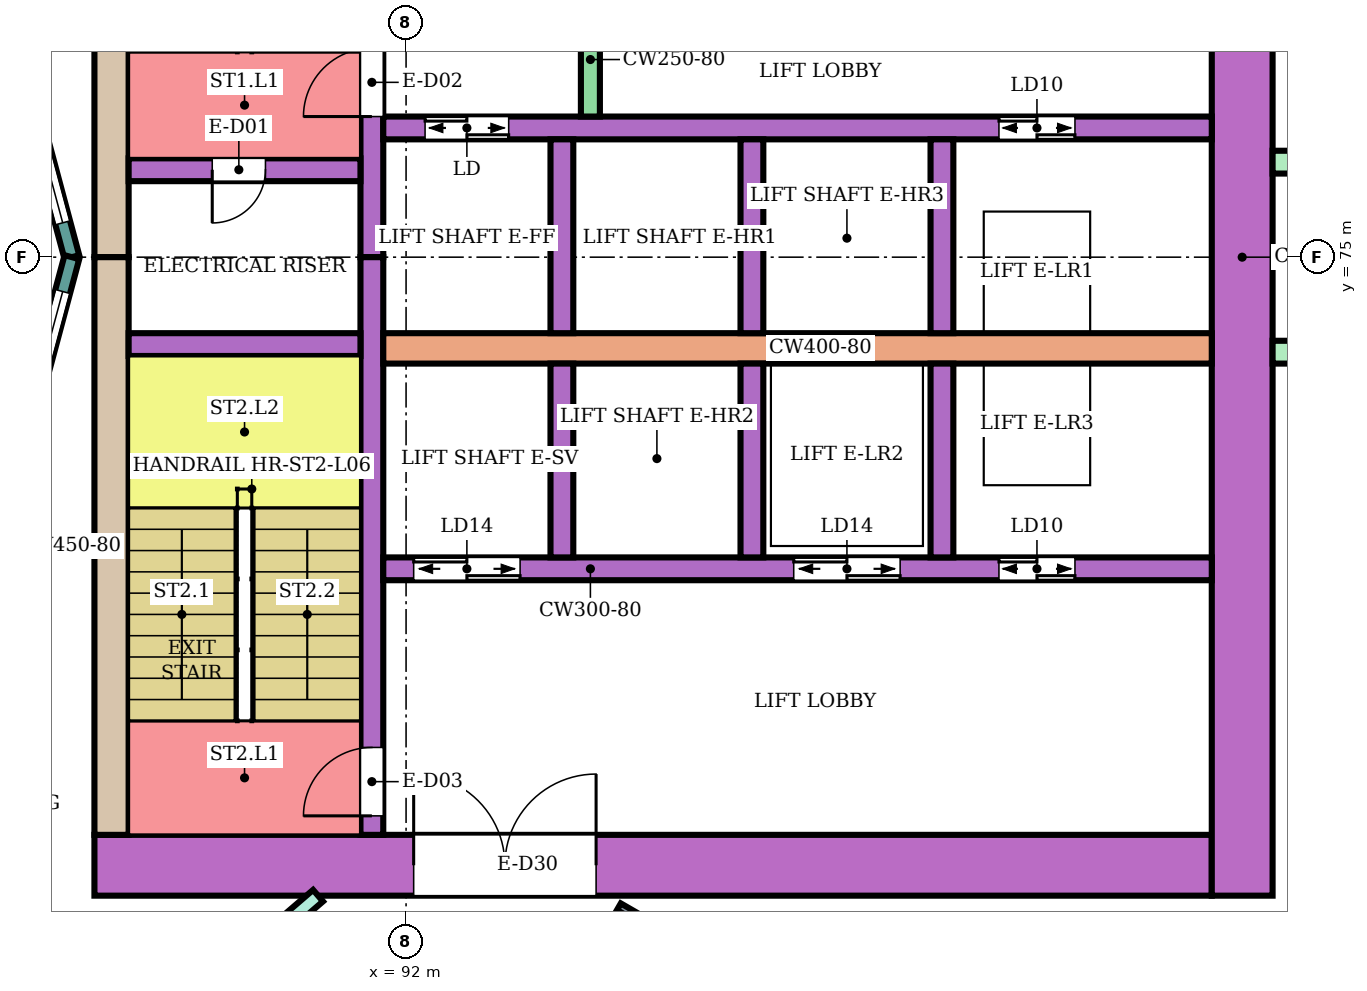
"""IFC4 building model, lengths in metres.
Left out: names, types, materials, properties, quantities, classifications, styles, units other than length and angle.
Written with IfcOpenShell. Run it as: python <this file> out.ifc"""

import sys

from ifc_helpers import new_model, si_unit, direction, frame, frame_2d, origin, place, context, subcontext, project, spatial, rectangle, extrude, element, fill, save


model = new_model("IFC4")
c1 = context("Model", 3, precision=1e-05, world=origin(), true_north=direction((0.0, 1.0)))
c2 = subcontext(c1, "Body", "Model", "MODEL_VIEW")
j1 = project(units=[si_unit("LENGTHUNIT", "METRE"), si_unit("PLANEANGLEUNIT", "RADIAN")], contexts=[c1])
p1 = place(None, origin())
s1 = spatial("IfcSite", under=j1, at=p1, CompositionType="ELEMENT")
p2 = place(p1, origin())
s2 = spatial("IfcBuilding", under=s1, at=p2, CompositionType="ELEMENT")
p3 = place(p2, frame((0.0, 0.0, 32.6)))
s3 = spatial("IfcBuildingStorey", under=s2, at=p3, CompositionType="ELEMENT", Elevation=32.6)
p4 = place(p3, frame((87.9, 67.0, 0.0), z_axis=(0.0, 0.0, 1.0), x_axis=(1.0, 0.0, 0.0)))
e1 = element("IfcWall", 1, at=p4, inside=s3, PredefinedType="SHEAR", context=c2, shape_type="SweptSolid", body=[
    extrude(rectangle(XDim=14.7, YDim=0.8, at=frame_2d((7.35, 0.0))), origin(), (0.0, 0.0, 1.0), 3.48),
])
p5 = place(p4, frame((4.2, 0.0, 0.0)))
e2 = element("IfcOpeningElement", 2, at=p5, cuts=e1, PredefinedType="OPENING", context=c2, shape_type="SweptSolid", body=[
    extrude(rectangle(XDim=2.4, YDim=2.4, at=frame_2d((1.2, 1.2))), frame((0.0, 0.41, 0.0), z_axis=(0.0, -1.0, 0.0), x_axis=(1.0, 0.0, 0.0)), (0.0, 0.0, 1.0), 0.82),
])
for number, where, z_axis, x_axis in (
    (3, (88.125, 75.0, 0.0), (0.0, 0.0, 1.0), (0.0, 1.0, 0.0)),
    (4, (88.125, 67.4, 0.0), (0.0, 0.0, 1.0), (0.0, 1.0, 0.0)),
):
    element("IfcWall", number, at=place(p3, frame(where, z_axis=z_axis, x_axis=x_axis)), inside=s3, PredefinedType="SHEAR", context=c2, shape_type="SweptSolid", body=[
        extrude(rectangle(XDim=7.6, YDim=0.45, at=frame_2d((3.8, 0.0))), origin(), (0.0, 0.0, 1.0), 3.48),
    ])
p6 = place(p3, frame((103.0, 66.6, 0.0), z_axis=(0.0, 0.0, 1.0), x_axis=(0.0, 1.0, 0.0)))
e5 = element("IfcWall", 5, at=p6, inside=s3, PredefinedType="SHEAR", context=c2, shape_type="SweptSolid", body=[
    extrude(rectangle(XDim=16.8, YDim=0.8, at=frame_2d((8.4, 0.0))), origin(), (0.0, 0.0, 1.0), 3.48),
])
p7 = place(p3, frame((91.55, 75.0, 0.0), z_axis=(0.0, 0.0, 1.0), x_axis=(0.0, 1.0, 0.0)))
e6 = element("IfcWall", 6, at=p7, inside=s3, PredefinedType="SHEAR", context=c2, shape_type="SweptSolid", body=[
    extrude(rectangle(XDim=7.6, YDim=0.3, at=frame_2d((3.8, 0.0))), origin(), (0.0, 0.0, 1.0), 3.48),
])
p8 = place(p7, frame((1.85, 0.0, 0.0)))
e7 = element("IfcOpeningElement", 7, at=p8, cuts=e6, PredefinedType="OPENING", context=c2, shape_type="SweptSolid", body=[
    extrude(rectangle(XDim=0.9, YDim=2.1, at=frame_2d((0.45, 1.05))), frame((0.0, 0.16, 0.0), z_axis=(0.0, -1.0, 0.0), x_axis=(1.0, 0.0, 0.0)), (0.0, 0.0, 1.0), 0.32),
])
p9 = place(p3, frame((91.55, 67.4, 0.0), z_axis=(0.0, 0.0, 1.0), x_axis=(0.0, 1.0, 0.0)))
e8 = element("IfcWall", 8, at=p9, inside=s3, PredefinedType="SHEAR", context=c2, shape_type="SweptSolid", body=[
    extrude(rectangle(XDim=7.6, YDim=0.3, at=frame_2d((3.8, 0.0))), origin(), (0.0, 0.0, 1.0), 3.48),
])
p10 = place(p9, frame((0.25, 0.0, 0.0)))
e9 = element("IfcOpeningElement", 9, at=p10, cuts=e8, PredefinedType="OPENING", context=c2, shape_type="SweptSolid", body=[
    extrude(rectangle(XDim=0.9, YDim=2.1, at=frame_2d((0.45, 1.05))), frame((0.0, 0.16, 0.0), z_axis=(0.0, -1.0, 0.0), x_axis=(1.0, 0.0, 0.0)), (0.0, 0.0, 1.0), 0.32),
])
p11 = place(p3, frame((88.35, 76.15, 0.0), z_axis=(0.0, 0.0, 1.0), x_axis=(1.0, 0.0, 0.0)))
e10 = element("IfcWall", 10, at=p11, inside=s3, PredefinedType="SHEAR", context=c2, shape_type="SweptSolid", body=[
    extrude(rectangle(XDim=3.05, YDim=0.3, at=frame_2d((1.525, 0.0))), origin(), (0.0, 0.0, 1.0), 3.48),
])
p12 = place(p11, frame((1.1, 0.0, 0.0)))
e11 = element("IfcOpeningElement", 11, at=p12, cuts=e10, PredefinedType="OPENING", context=c2, shape_type="SweptSolid", body=[
    extrude(rectangle(XDim=0.7, YDim=2.0, at=frame_2d((0.35, 1.0))), frame((0.0, 0.16, 0.0), z_axis=(0.0, -1.0, 0.0), x_axis=(1.0, 0.0, 0.0)), (0.0, 0.0, 1.0), 0.32),
])
p13 = place(p3, frame((88.35, 73.85, 0.0), z_axis=(0.0, 0.0, 1.0), x_axis=(1.0, 0.0, 0.0)))
e12 = element("IfcWall", 12, at=p13, inside=s3, PredefinedType="SHEAR", context=c2, shape_type="SweptSolid", body=[
    extrude(rectangle(XDim=3.05, YDim=0.3, at=frame_2d((1.525, 0.0))), origin(), (0.0, 0.0, 1.0), 3.48),
])
p14 = place(p3, frame((91.7, 76.7, 0.0), z_axis=(0.0, 0.0, 1.0), x_axis=(1.0, 0.0, 0.0)))
e13 = element("IfcWall", 13, at=p14, inside=s3, PredefinedType="SHEAR", context=c2, shape_type="SweptSolid", body=[
    extrude(rectangle(XDim=10.9, YDim=0.3, at=frame_2d((5.45, 0.0))), origin(), (0.0, 0.0, 1.0), 3.48),
])
p15 = place(p14, frame((0.55, 0.0, 0.0)))
e14 = element("IfcOpeningElement", 14, at=p15, cuts=e13, PredefinedType="OPENING", context=c2, shape_type="SweptSolid", body=[
    extrude(rectangle(XDim=1.1, YDim=2.1, at=frame_2d((0.55, 1.05))), frame((0.0, 0.16, 0.0), z_axis=(0.0, -1.0, 0.0), x_axis=(1.0, 0.0, 0.0)), (0.0, 0.0, 1.0), 0.32),
])
p16 = place(p14, frame((8.1, 0.0, 0.0)))
e15 = element("IfcOpeningElement", 15, at=p16, cuts=e13, PredefinedType="OPENING", context=c2, shape_type="SweptSolid", body=[
    extrude(rectangle(XDim=1.0, YDim=2.1, at=frame_2d((0.5, 1.05))), frame((0.0, 0.16, 0.0), z_axis=(0.0, -1.0, 0.0), x_axis=(1.0, 0.0, 0.0)), (0.0, 0.0, 1.0), 0.32),
])
p17 = place(p3, frame((91.7, 73.8, 0.0), z_axis=(0.0, 0.0, 1.0), x_axis=(1.0, 0.0, 0.0)))
e16 = element("IfcWall", 16, at=p17, inside=s3, PredefinedType="SHEAR", context=c2, shape_type="SweptSolid", body=[
    extrude(rectangle(XDim=10.9, YDim=0.4, at=frame_2d((5.45, 0.0))), origin(), (0.0, 0.0, 1.0), 3.48),
])
p18 = place(p3, frame((91.7, 70.9, 0.0), z_axis=(0.0, 0.0, 1.0), x_axis=(1.0, 0.0, 0.0)))
e17 = element("IfcWall", 17, at=p18, inside=s3, PredefinedType="SHEAR", context=c2, shape_type="SweptSolid", body=[
    extrude(rectangle(XDim=10.9, YDim=0.3, at=frame_2d((5.45, 0.0))), origin(), (0.0, 0.0, 1.0), 3.48),
])
p19 = place(p18, frame((0.4, 0.0, 0.0)))
e18 = element("IfcOpeningElement", 18, at=p19, cuts=e17, PredefinedType="OPENING", context=c2, shape_type="SweptSolid", body=[
    extrude(rectangle(XDim=1.4, YDim=2.1, at=frame_2d((0.7, 1.05))), frame((0.0, 0.16, 0.0), z_axis=(0.0, -1.0, 0.0), x_axis=(1.0, 0.0, 0.0)), (0.0, 0.0, 1.0), 0.32),
])
p20 = place(p18, frame((5.4, 0.0, 0.0)))
e19 = element("IfcOpeningElement", 19, at=p20, cuts=e17, PredefinedType="OPENING", context=c2, shape_type="SweptSolid", body=[
    extrude(rectangle(XDim=1.4, YDim=2.1, at=frame_2d((0.7, 1.05))), frame((0.0, 0.16, 0.0), z_axis=(0.0, -1.0, 0.0), x_axis=(1.0, 0.0, 0.0)), (0.0, 0.0, 1.0), 0.32),
])
p21 = place(p18, frame((8.1, 0.0, 0.0)))
e20 = element("IfcOpeningElement", 20, at=p21, cuts=e17, PredefinedType="OPENING", context=c2, shape_type="SweptSolid", body=[
    extrude(rectangle(XDim=1.0, YDim=2.1, at=frame_2d((0.5, 1.05))), frame((0.0, 0.16, 0.0), z_axis=(0.0, -1.0, 0.0), x_axis=(1.0, 0.0, 0.0)), (0.0, 0.0, 1.0), 0.32),
])
for number, where, z_axis, x_axis in (
    (21, (94.05, 74.0, 0.0), (0.0, 0.0, 1.0), (0.0, 1.0, 0.0)),
    (22, (96.55, 74.0, 0.0), (0.0, 0.0, 1.0), (0.0, 1.0, 0.0)),
    (23, (99.05, 74.0, 0.0), (0.0, 0.0, 1.0), (0.0, 1.0, 0.0)),
    (24, (94.05, 71.05, 0.0), (0.0, 0.0, 1.0), (0.0, 1.0, 0.0)),
    (25, (96.55, 71.05, 0.0), (0.0, 0.0, 1.0), (0.0, 1.0, 0.0)),
    (26, (99.05, 71.05, 0.0), (0.0, 0.0, 1.0), (0.0, 1.0, 0.0)),
):
    element("IfcWall", number, at=place(p3, frame(where, z_axis=z_axis, x_axis=x_axis)), inside=s3, PredefinedType="SHEAR", context=c2, shape_type="SweptSolid", body=[
        extrude(rectangle(XDim=2.55, YDim=0.3, at=frame_2d((1.275, 0.0))), origin(), (0.0, 0.0, 1.0), 3.48),
    ])
p22 = place(p3, frame((94.425, 76.85, 0.0), z_axis=(0.0, 0.0, 1.0), x_axis=(0.0, 1.0, 0.0)))
e27 = element("IfcWall", 27, at=p22, inside=s3, PredefinedType="SHEAR", context=c2, shape_type="SweptSolid", body=[
    extrude(rectangle(XDim=1.5, YDim=0.25, at=frame_2d((0.75, 0.0))), origin(), (0.0, 0.0, 1.0), 3.48),
])
for number, where, z_axis, x_axis in (
    (28, (103.4, 73.75, 0.0), (0.0, 0.0, 1.0), (1.0, 0.0, 0.0)),
    (29, (103.4, 76.25, 0.0), (0.0, 0.0, 1.0), (1.0, 0.0, 0.0)),
):
    element("IfcWall", number, at=place(p3, frame(where, z_axis=z_axis, x_axis=x_axis)), inside=s3, PredefinedType="NOTDEFINED", context=c2, shape_type="SweptSolid", body=[
        extrude(rectangle(XDim=2.416, YDim=0.3, at=frame_2d((1.208, 0.0))), origin(), (0.0, 0.0, 1.0), 3.8),
    ])
p23 = place(p3, frame((87.604, 75.0, 0.0), z_axis=(0.0, 0.0, 1.0), x_axis=(-0.258789828301, 0.965933654434, 0.0)))
e30 = element("IfcWall", 30, at=p23, inside=s3, PredefinedType="NOTDEFINED", context=c2, shape_type="SweptSolid", body=[
    extrude(rectangle(XDim=3.936, YDim=0.2, at=frame_2d((1.968, 0.0))), origin(), (0.0, 0.0, 1.0), 3.8),
])
p24 = place(p23, frame((0.468, 0.0, 0.9)))
e31 = element("IfcOpeningElement", 31, at=p24, cuts=e30, PredefinedType="OPENING", context=c2, shape_type="SweptSolid", body=[
    extrude(rectangle(XDim=3.0, YDim=2.3, at=frame_2d((1.5, 1.15))), frame((0.0, 0.11, 0.0), z_axis=(0.0, -1.0, 0.0), x_axis=(1.0, 0.0, 0.0)), (0.0, 0.0, 1.0), 0.22),
])
p25 = place(p3, frame((86.585, 71.198, 0.0), z_axis=(0.0, 0.0, 1.0), x_axis=(0.258789828301, 0.965933654434, 0.0)))
e32 = element("IfcWall", 32, at=p25, inside=s3, PredefinedType="NOTDEFINED", context=c2, shape_type="SweptSolid", body=[
    extrude(rectangle(XDim=3.936, YDim=0.2, at=frame_2d((1.968, 0.0))), origin(), (0.0, 0.0, 1.0), 3.8),
])
p26 = place(p25, frame((0.468, 0.0, 0.9)))
e33 = element("IfcOpeningElement", 33, at=p26, cuts=e32, PredefinedType="OPENING", context=c2, shape_type="SweptSolid", body=[
    extrude(rectangle(XDim=3.0, YDim=2.3, at=frame_2d((1.5, 1.15))), frame((0.0, 0.11, 0.0), z_axis=(0.0, -1.0, 0.0), x_axis=(1.0, 0.0, 0.0)), (0.0, 0.0, 1.0), 0.22),
])
p27 = place(p3, frame((86.877, 63.189, 0.0), z_axis=(0.0, 0.0, 1.0), x_axis=(0.758075808328, 0.652166442581, 0.0)))
e34 = element("IfcWall", 34, at=p27, inside=s3, PredefinedType="PARTITIONING", context=c2, shape_type="SweptSolid", body=[
    extrude(rectangle(XDim=5.23, YDim=0.2, at=frame_2d((2.615, 0.0))), origin(), (0.0, 0.0, 1.0), 3.35),
])
p28 = place(p27, frame((2.165, 0.0, 0.0)))
e35 = element("IfcOpeningElement", 35, at=p28, cuts=e34, PredefinedType="OPENING", context=c2, shape_type="SweptSolid", body=[
    extrude(rectangle(XDim=0.9, YDim=2.1, at=frame_2d((0.45, 1.05))), frame((0.0, 0.11, 0.0), z_axis=(0.0, -1.0, 0.0), x_axis=(1.0, 0.0, 0.0)), (0.0, 0.0, 1.0), 0.22),
])
p29 = place(p3, frame((94.8, 66.455, 0.0), z_axis=(0.0, 0.0, 1.0), x_axis=(0.86602264145, -0.500004784474, 0.0)))
e36 = element("IfcWall", 36, at=p29, inside=s3, PredefinedType="PARTITIONING", context=c2, shape_type="SweptSolid", body=[
    extrude(rectangle(XDim=8.708, YDim=0.1, at=frame_2d((4.354, 0.0))), origin(), (0.0, 0.0, 1.0), 3.35),
])
p30 = place(p29, frame((3.879, 0.0, 0.0)))
e37 = element("IfcOpeningElement", 37, at=p30, cuts=e36, PredefinedType="OPENING", context=c2, shape_type="SweptSolid", body=[
    extrude(rectangle(XDim=0.9, YDim=2.1, at=frame_2d((0.45, 1.05))), frame((0.0, 0.06, 0.0), z_axis=(0.0, -1.0, 0.0), x_axis=(1.0, 0.0, 0.0)), (0.0, 0.0, 1.0), 0.12),
])
p31 = place(p24, origin())
e38 = element("IfcWindow", 38, at=p31, inside=s3, PartitioningType="SINGLE_PANEL", PredefinedType="WINDOW", context=c2, shape_type="SweptSolid", body=[
    extrude(rectangle(XDim=3.0, YDim=2.3, at=frame_2d((1.5, 1.15))), frame((0.0, 0.03, 0.0), z_axis=(0.0, -1.0, 0.0), x_axis=(1.0, 0.0, 0.0)), (0.0, 0.0, 1.0), 0.06),
])
fill(e31, e38)
p32 = place(p26, origin())
e39 = element("IfcWindow", 39, at=p32, inside=s3, PartitioningType="SINGLE_PANEL", PredefinedType="WINDOW", context=c2, shape_type="SweptSolid", body=[
    extrude(rectangle(XDim=3.0, YDim=2.3, at=frame_2d((1.5, 1.15))), frame((0.0, 0.03, 0.0), z_axis=(0.0, -1.0, 0.0), x_axis=(1.0, 0.0, 0.0)), (0.0, 0.0, 1.0), 0.06),
])
fill(e33, e39)
p33 = place(p12, frame((0.7, 0.0, 0.0), z_axis=(0.0, 0.0, 1.0), x_axis=(-1.0, 0.0, 0.0)))
e40 = element("IfcDoor", 40, at=p33, inside=s3, OperationType="SINGLE_SWING_RIGHT", PredefinedType="DOOR", context=c2, shape_type="SweptSolid", body=[
    extrude(rectangle(XDim=0.7, YDim=2.0, at=frame_2d((0.35, 1.0))), frame((0.0, 0.025, 0.0), z_axis=(0.0, -1.0, 0.0), x_axis=(1.0, 0.0, 0.0)), (0.0, 0.0, 1.0), 0.05),
])
fill(e11, e40)
p34 = place(p8, origin())
e41 = element("IfcDoor", 41, at=p34, inside=s3, OperationType="SINGLE_SWING_LEFT", PredefinedType="DOOR", context=c2, shape_type="SweptSolid", body=[
    extrude(rectangle(XDim=0.9, YDim=2.1, at=frame_2d((0.45, 1.05))), frame((0.0, 0.025, 0.0), z_axis=(0.0, -1.0, 0.0), x_axis=(1.0, 0.0, 0.0)), (0.0, 0.0, 1.0), 0.05),
])
fill(e7, e41)
p35 = place(p10, origin())
e42 = element("IfcDoor", 42, at=p35, inside=s3, OperationType="SINGLE_SWING_LEFT", PredefinedType="DOOR", context=c2, shape_type="SweptSolid", body=[
    extrude(rectangle(XDim=0.9, YDim=2.1, at=frame_2d((0.45, 1.05))), frame((0.0, 0.025, 0.0), z_axis=(0.0, -1.0, 0.0), x_axis=(1.0, 0.0, 0.0)), (0.0, 0.0, 1.0), 0.05),
])
fill(e9, e42)
p36 = place(p15, origin())
e43 = element("IfcDoor", 43, at=p36, inside=s3, OperationType="DOUBLE_DOOR_SLIDING", PredefinedType="DOOR", context=c2, shape_type="SweptSolid", body=[
    extrude(rectangle(XDim=1.1, YDim=2.1, at=frame_2d((0.55, 1.05))), frame((0.0, 0.025, 0.0), z_axis=(0.0, -1.0, 0.0), x_axis=(1.0, 0.0, 0.0)), (0.0, 0.0, 1.0), 0.05),
])
fill(e14, e43)
p37 = place(p16, origin())
e44 = element("IfcDoor", 44, at=p37, inside=s3, OperationType="DOUBLE_DOOR_SLIDING", PredefinedType="DOOR", context=c2, shape_type="SweptSolid", body=[
    extrude(rectangle(XDim=1.0, YDim=2.1, at=frame_2d((0.5, 1.05))), frame((0.0, 0.025, 0.0), z_axis=(0.0, -1.0, 0.0), x_axis=(1.0, 0.0, 0.0)), (0.0, 0.0, 1.0), 0.05),
])
fill(e15, e44)
p38 = place(p19, origin())
e45 = element("IfcDoor", 45, at=p38, inside=s3, OperationType="DOUBLE_DOOR_SLIDING", PredefinedType="DOOR", context=c2, shape_type="SweptSolid", body=[
    extrude(rectangle(XDim=1.4, YDim=2.1, at=frame_2d((0.7, 1.05))), frame((0.0, 0.025, 0.0), z_axis=(0.0, -1.0, 0.0), x_axis=(1.0, 0.0, 0.0)), (0.0, 0.0, 1.0), 0.05),
])
fill(e18, e45)
p39 = place(p20, origin())
e46 = element("IfcDoor", 46, at=p39, inside=s3, OperationType="DOUBLE_DOOR_SLIDING", PredefinedType="DOOR", context=c2, shape_type="SweptSolid", body=[
    extrude(rectangle(XDim=1.4, YDim=2.1, at=frame_2d((0.7, 1.05))), frame((0.0, 0.025, 0.0), z_axis=(0.0, -1.0, 0.0), x_axis=(1.0, 0.0, 0.0)), (0.0, 0.0, 1.0), 0.05),
])
fill(e19, e46)
p40 = place(p21, origin())
e47 = element("IfcDoor", 47, at=p40, inside=s3, OperationType="DOUBLE_DOOR_SLIDING", PredefinedType="DOOR", context=c2, shape_type="SweptSolid", body=[
    extrude(rectangle(XDim=1.0, YDim=2.1, at=frame_2d((0.5, 1.05))), frame((0.0, 0.025, 0.0), z_axis=(0.0, -1.0, 0.0), x_axis=(1.0, 0.0, 0.0)), (0.0, 0.0, 1.0), 0.05),
])
fill(e20, e47)
p41 = place(p5, origin())
e48 = element("IfcDoor", 48, at=p41, inside=s3, OperationType="DOUBLE_DOOR_SINGLE_SWING", PredefinedType="DOOR", context=c2, shape_type="SweptSolid", body=[
    extrude(rectangle(XDim=2.4, YDim=2.4, at=frame_2d((1.2, 1.2))), frame((0.0, 0.025, 0.0), z_axis=(0.0, -1.0, 0.0), x_axis=(1.0, 0.0, 0.0)), (0.0, 0.0, 1.0), 0.05),
])
fill(e2, e48)
save(model, sys.argv[1])
